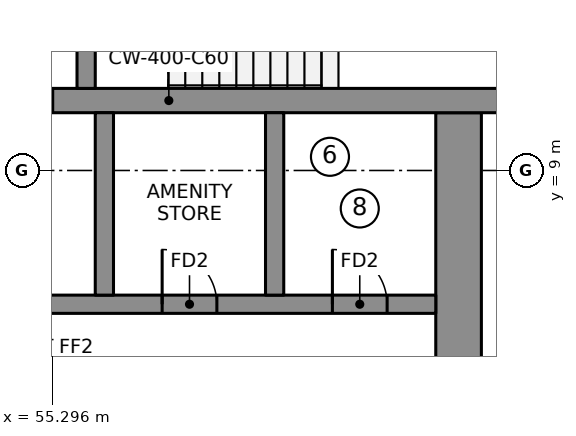
"""IFC4 building model, lengths in metres.
Left out: names, types, materials, properties, quantities, classifications, styles, units other than length and angle.
Written with IfcOpenShell. Run it as: python <this file> out.ifc"""

import sys

from ifc_helpers import new_model, si_unit, direction, frame, frame_2d, origin, place, context, subcontext, project, spatial, rectangle, extrude, element, fill, save


model = new_model("IFC4")
c1 = context("Model", 3, precision=1e-05, world=origin(), true_north=direction((0.0, 1.0)))
c2 = subcontext(c1, "Body", "Model", "MODEL_VIEW")
j1 = project(units=[si_unit("LENGTHUNIT", "METRE"), si_unit("PLANEANGLEUNIT", "RADIAN")], contexts=[c1])
p1 = place(None, origin())
s1 = spatial("IfcSite", under=j1, at=p1, CompositionType="ELEMENT")
p2 = place(p1, origin())
s2 = spatial("IfcBuilding", under=s1, at=p2, CompositionType="ELEMENT")
p3 = place(p2, frame((0.0, 0.0, 186.15)))
s3 = spatial("IfcBuildingStorey", under=s2, at=p3, CompositionType="ELEMENT", Elevation=186.15)
p4 = place(p3, frame((61.975, -9.95, 0.0), z_axis=(0.0, 0.0, 1.0), x_axis=(0.0, 1.0, 0.0)))
e1 = element("IfcWall", 1, at=p4, inside=s3, PredefinedType="SHEAR", context=c2, shape_type="SweptSolid", body=[
    extrude(rectangle(XDim=19.9, YDim=0.75, at=frame_2d((9.95, 0.0))), origin(), (0.0, 0.0, 1.0), 3.55),
])
p5 = place(p3, frame((50.7, 10.15, 0.0), z_axis=(0.0, 0.0, 1.0), x_axis=(1.0, 0.0, 0.0)))
e2 = element("IfcWall", 2, at=p5, inside=s3, PredefinedType="SHEAR", context=c2, shape_type="SweptSolid", body=[
    extrude(rectangle(XDim=13.02, YDim=0.4, at=frame_2d((6.51, 0.0))), origin(), (0.0, 0.0, 1.0), 3.55),
])
p6 = place(p5, frame((0.7, 0.0, 0.0)))
e3 = element("IfcOpeningElement", 3, at=p6, cuts=e2, PredefinedType="OPENING", context=c2, shape_type="SweptSolid", body=[
    extrude(rectangle(XDim=1.1, YDim=2.1, at=frame_2d((0.55, 1.05))), frame((0.0, 0.21, 0.0), z_axis=(0.0, -1.0, 0.0), x_axis=(1.0, 0.0, 0.0)), (0.0, 0.0, 1.0), 0.42),
])
p7 = place(p5, frame((3.5, 0.0, 0.0)))
e4 = element("IfcOpeningElement", 4, at=p7, cuts=e2, PredefinedType="OPENING", context=c2, shape_type="SweptSolid", body=[
    extrude(rectangle(XDim=1.1, YDim=2.1, at=frame_2d((0.55, 1.05))), frame((0.0, 0.21, 0.0), z_axis=(0.0, -1.0, 0.0), x_axis=(1.0, 0.0, 0.0)), (0.0, 0.0, 1.0), 0.42),
])
p8 = place(p3, frame((50.7, 6.8, 0.0), z_axis=(0.0, 0.0, 1.0), x_axis=(1.0, 0.0, 0.0)))
e5 = element("IfcWall", 5, at=p8, inside=s3, PredefinedType="SHEAR", context=c2, shape_type="SweptSolid", body=[
    extrude(rectangle(XDim=10.9, YDim=0.3, at=frame_2d((5.45, 0.0))), origin(), (0.0, 0.0, 1.0), 3.55),
])
p9 = place(p8, frame((6.4, 0.0, 0.0)))
e6 = element("IfcOpeningElement", 6, at=p9, cuts=e5, PredefinedType="OPENING", context=c2, shape_type="SweptSolid", body=[
    extrude(rectangle(XDim=0.9, YDim=2.1, at=frame_2d((0.45, 1.05))), frame((0.0, 0.16, 0.0), z_axis=(0.0, -1.0, 0.0), x_axis=(1.0, 0.0, 0.0)), (0.0, 0.0, 1.0), 0.32),
])
p10 = place(p8, frame((9.2, 0.0, 0.0)))
e7 = element("IfcOpeningElement", 7, at=p10, cuts=e5, PredefinedType="OPENING", context=c2, shape_type="SweptSolid", body=[
    extrude(rectangle(XDim=0.9, YDim=2.1, at=frame_2d((0.45, 1.05))), frame((0.0, 0.16, 0.0), z_axis=(0.0, -1.0, 0.0), x_axis=(1.0, 0.0, 0.0)), (0.0, 0.0, 1.0), 0.32),
])
for number, where, z_axis, x_axis in (
    (8, (56.15, 6.95, 0.0), (0.0, 0.0, 1.0), (0.0, 1.0, 0.0)),
    (9, (58.95, 6.95, 0.0), (0.0, 0.0, 1.0), (0.0, 1.0, 0.0)),
):
    element("IfcWall", number, at=place(p3, frame(where, z_axis=z_axis, x_axis=x_axis)), inside=s3, PredefinedType="SHEAR", context=c2, shape_type="SweptSolid", body=[
        extrude(rectangle(XDim=3.0, YDim=0.3, at=frame_2d((1.5, 0.0))), origin(), (0.0, 0.0, 1.0), 3.55),
    ])
p11 = place(p3, frame((55.85, 10.35, 0.0), z_axis=(0.0, 0.0, 1.0), x_axis=(0.0, 1.0, 0.0)))
e10 = element("IfcWall", 10, at=p11, inside=s3, PredefinedType="SHEAR", context=c2, shape_type="SweptSolid", body=[
    extrude(rectangle(XDim=5.4, YDim=0.3, at=frame_2d((2.7, 0.0))), origin(), (0.0, 0.0, 1.0), 3.55),
])
p12 = place(p11, frame((1.43, 0.0, 0.0)))
e11 = element("IfcOpeningElement", 11, at=p12, cuts=e10, PredefinedType="OPENING", context=c2, shape_type="SweptSolid", body=[
    extrude(rectangle(XDim=1.1, YDim=2.1, at=frame_2d((0.55, 1.05))), frame((0.0, 0.16, 0.0), z_axis=(0.0, -1.0, 0.0), x_axis=(1.0, 0.0, 0.0)), (0.0, 0.0, 1.0), 0.32),
])
p13 = place(p11, frame((3.6, 0.0, 0.0)))
e12 = element("IfcOpeningElement", 12, at=p13, cuts=e10, PredefinedType="OPENING", context=c2, shape_type="SweptSolid", body=[
    extrude(rectangle(XDim=1.1, YDim=2.1, at=frame_2d((0.55, 1.05))), frame((0.0, 0.16, 0.0), z_axis=(0.0, -1.0, 0.0), x_axis=(1.0, 0.0, 0.0)), (0.0, 0.0, 1.0), 0.32),
])
p14 = place(p9, origin())
e13 = element("IfcDoor", 13, at=p14, inside=s3, OperationType="SINGLE_SWING_LEFT", PredefinedType="DOOR", context=c2, shape_type="SweptSolid", body=[
    extrude(rectangle(XDim=0.9, YDim=2.1, at=frame_2d((0.45, 1.05))), frame((0.0, 0.025, 0.0), z_axis=(0.0, -1.0, 0.0), x_axis=(1.0, 0.0, 0.0)), (0.0, 0.0, 1.0), 0.05),
])
fill(e6, e13)
p15 = place(p10, origin())
e14 = element("IfcDoor", 14, at=p15, inside=s3, OperationType="SINGLE_SWING_LEFT", PredefinedType="DOOR", context=c2, shape_type="SweptSolid", body=[
    extrude(rectangle(XDim=0.9, YDim=2.1, at=frame_2d((0.45, 1.05))), frame((0.0, 0.025, 0.0), z_axis=(0.0, -1.0, 0.0), x_axis=(1.0, 0.0, 0.0)), (0.0, 0.0, 1.0), 0.05),
])
fill(e7, e14)
save(model, sys.argv[1])
